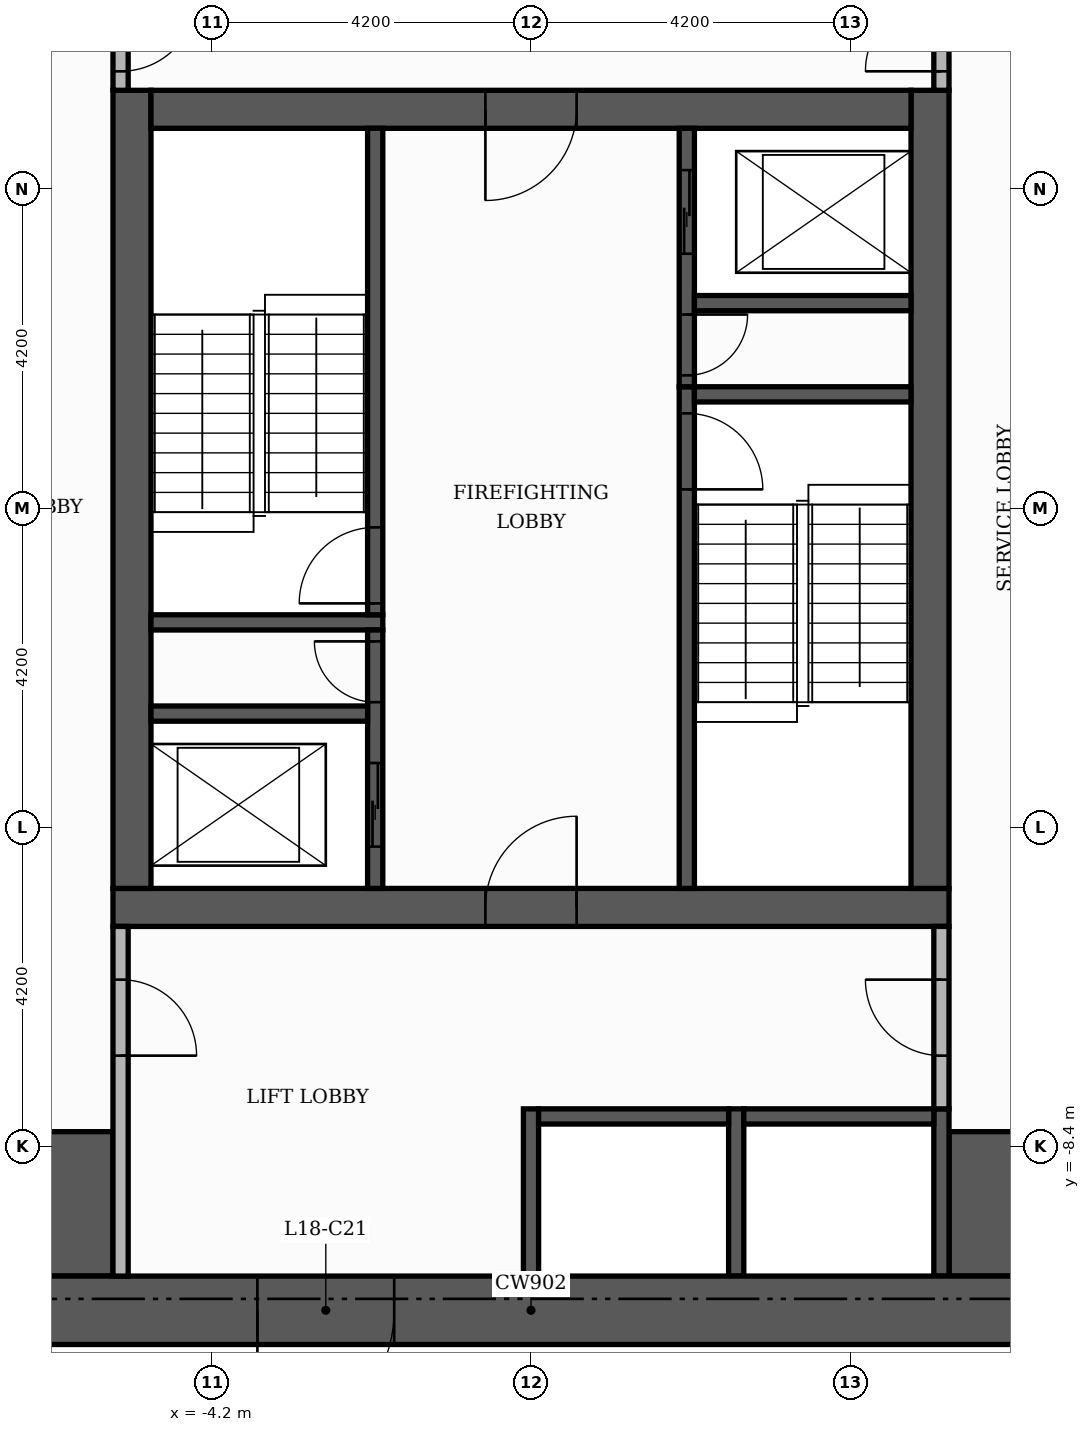
"""IFC4 building model, lengths in metres.
Left out: names, types, materials, properties, quantities, classifications, styles, units other than length and angle.
Written with IfcOpenShell. Run it as: python <this file> out.ifc"""

import sys

from ifc_helpers import new_model, si_unit, direction, frame, frame_2d, origin, place, context, subcontext, project, spatial, rectangle, extrude, element, fill, save


model = new_model("IFC4")
c1 = context("Model", 3, precision=1e-05, world=origin(), true_north=direction((0.0, 1.0)))
c2 = subcontext(c1, "Body", "Model", "MODEL_VIEW")
j1 = project(units=[si_unit("LENGTHUNIT", "METRE"), si_unit("PLANEANGLEUNIT", "RADIAN")], contexts=[c1])
p1 = place(None, origin())
s1 = spatial("IfcSite", under=j1, at=p1, CompositionType="ELEMENT")
p2 = place(p1, origin())
s2 = spatial("IfcBuilding", under=s1, at=p2, CompositionType="ELEMENT")
p3 = place(p2, frame((0.0, 0.0, 79.2)))
s3 = spatial("IfcBuildingStorey", under=s2, at=p3, CompositionType="ELEMENT", Elevation=79.2)
p4 = place(p3, frame((-5.5, -5.25, 0.0), z_axis=(0.0, 0.0, 1.0), x_axis=(1.0, 0.0, 0.0)))
e1 = element("IfcWall", 1, at=p4, inside=s3, PredefinedType="SHEAR", context=c2, shape_type="SweptSolid", body=[
    extrude(rectangle(XDim=11.0, YDim=0.5, at=frame_2d((5.5, 0.0))), origin(), (0.0, 0.0, 1.0), 3.48),
])
p5 = place(p4, frame((4.9, 0.0, 0.0)))
e2 = element("IfcOpeningElement", 2, at=p5, cuts=e1, PredefinedType="OPENING", context=c2, shape_type="SweptSolid", body=[
    extrude(rectangle(XDim=1.2, YDim=2.1, at=frame_2d((0.6, 1.05))), frame((0.0, 0.26, 0.0), z_axis=(0.0, -1.0, 0.0), x_axis=(1.0, 0.0, 0.0)), (0.0, 0.0, 1.0), 0.52),
])
for number, where, z_axis, x_axis in (
    (3, (-5.25, -5.0, 0.0), (0.0, 0.0, 1.0), (0.0, 1.0, 0.0)),
    (4, (5.25, -5.0, 0.0), (0.0, 0.0, 1.0), (0.0, 1.0, 0.0)),
):
    element("IfcWall", number, at=place(p3, frame(where, z_axis=z_axis, x_axis=x_axis)), inside=s3, PredefinedType="SHEAR", context=c2, shape_type="SweptSolid", body=[
        extrude(rectangle(XDim=10.5, YDim=0.5, at=frame_2d((5.25, 0.0))), origin(), (0.0, 0.0, 1.0), 3.48),
    ])
p6 = place(p3, frame((-5.0, 5.25, 0.0), z_axis=(0.0, 0.0, 1.0), x_axis=(1.0, 0.0, 0.0)))
e5 = element("IfcWall", 5, at=p6, inside=s3, PredefinedType="SHEAR", context=c2, shape_type="SweptSolid", body=[
    extrude(rectangle(XDim=10.0, YDim=0.5, at=frame_2d((5.0, 0.0))), origin(), (0.0, 0.0, 1.0), 3.48),
])
p7 = place(p6, frame((4.4, 0.0, 0.0)))
e6 = element("IfcOpeningElement", 6, at=p7, cuts=e5, PredefinedType="OPENING", context=c2, shape_type="SweptSolid", body=[
    extrude(rectangle(XDim=1.2, YDim=2.1, at=frame_2d((0.6, 1.05))), frame((0.0, 0.26, 0.0), z_axis=(0.0, -1.0, 0.0), x_axis=(1.0, 0.0, 0.0)), (0.0, 0.0, 1.0), 0.52),
])
for number, where, z_axis, x_axis in (
    (7, (-10.1, -9.15, 0.0), (0.0, 0.0, 1.0), (1.0, 0.0, 0.0)),
    (8, (5.5, -9.15, 0.0), (0.0, 0.0, 1.0), (1.0, 0.0, 0.0)),
):
    element("IfcWall", number, at=place(p3, frame(where, z_axis=z_axis, x_axis=x_axis)), inside=s3, PredefinedType="SHEAR", context=c2, shape_type="SweptSolid", body=[
        extrude(rectangle(XDim=4.6, YDim=1.9, at=frame_2d((2.3, 0.0))), origin(), (0.0, 0.0, 1.0), 3.48),
    ])
p8 = place(p3, frame((2.05, -5.0, 0.0), z_axis=(0.0, 0.0, 1.0), x_axis=(0.0, 1.0, 0.0)))
e9 = element("IfcWall", 9, at=p8, inside=s3, PredefinedType="SHEAR", context=c2, shape_type="SweptSolid", body=[
    extrude(rectangle(XDim=6.6, YDim=0.2, at=frame_2d((3.3, 0.0))), origin(), (0.0, 0.0, 1.0), 3.48),
])
p9 = place(p8, frame((5.25, 0.0, 0.0)))
e10 = element("IfcOpeningElement", 10, at=p9, cuts=e9, PredefinedType="OPENING", context=c2, shape_type="SweptSolid", body=[
    extrude(rectangle(XDim=1.0, YDim=2.1, at=frame_2d((0.5, 1.05))), frame((0.0, 0.11, 0.0), z_axis=(0.0, -1.0, 0.0), x_axis=(1.0, 0.0, 0.0)), (0.0, 0.0, 1.0), 0.22),
])
p10 = place(p3, frame((-5.0, -1.5, 0.0), z_axis=(0.0, 0.0, 1.0), x_axis=(1.0, 0.0, 0.0)))
e11 = element("IfcWall", 11, at=p10, inside=s3, PredefinedType="SHEAR", context=c2, shape_type="SweptSolid", body=[
    extrude(rectangle(XDim=3.05, YDim=0.2, at=frame_2d((1.525, 0.0))), origin(), (0.0, 0.0, 1.0), 3.48),
])
p11 = place(p3, frame((-2.05, -1.4, 0.0), z_axis=(0.0, 0.0, 1.0), x_axis=(0.0, 1.0, 0.0)))
e12 = element("IfcWall", 12, at=p11, inside=s3, PredefinedType="SHEAR", context=c2, shape_type="SweptSolid", body=[
    extrude(rectangle(XDim=6.4, YDim=0.2, at=frame_2d((3.2, 0.0))), origin(), (0.0, 0.0, 1.0), 3.48),
])
p12 = place(p11, frame((0.15, 0.0, 0.0)))
e13 = element("IfcOpeningElement", 13, at=p12, cuts=e12, PredefinedType="OPENING", context=c2, shape_type="SweptSolid", body=[
    extrude(rectangle(XDim=1.0, YDim=2.1, at=frame_2d((0.5, 1.05))), frame((0.0, 0.11, 0.0), z_axis=(0.0, -1.0, 0.0), x_axis=(1.0, 0.0, 0.0)), (0.0, 0.0, 1.0), 0.22),
])
p13 = place(p3, frame((2.15, 1.5, 0.0), z_axis=(0.0, 0.0, 1.0), x_axis=(1.0, 0.0, 0.0)))
e14 = element("IfcWall", 14, at=p13, inside=s3, PredefinedType="SHEAR", context=c2, shape_type="SweptSolid", body=[
    extrude(rectangle(XDim=2.85, YDim=0.2, at=frame_2d((1.425, 0.0))), origin(), (0.0, 0.0, 1.0), 3.48),
])
for number, where, z_axis, x_axis in (
    (15, (0.0, -10.1, 0.0), (0.0, 0.0, 1.0), (0.0, 1.0, 0.0)),
    (16, (2.7, -10.1, 0.0), (0.0, 0.0, 1.0), (0.0, 1.0, 0.0)),
    (17, (5.4, -10.1, 0.0), (0.0, 0.0, 1.0), (0.0, 1.0, 0.0)),
):
    element("IfcWall", number, at=place(p3, frame(where, z_axis=z_axis, x_axis=x_axis)), inside=s3, PredefinedType="SHEAR", context=c2, shape_type="SweptSolid", body=[
        extrude(rectangle(XDim=2.2, YDim=0.2, at=frame_2d((1.1, 0.0))), origin(), (0.0, 0.0, 1.0), 3.48),
    ])
for number, where, z_axis, x_axis in (
    (18, (0.1, -8.0, 0.0), (0.0, 0.0, 1.0), (1.0, 0.0, 0.0)),
    (19, (2.8, -8.0, 0.0), (0.0, 0.0, 1.0), (1.0, 0.0, 0.0)),
):
    element("IfcWall", number, at=place(p3, frame(where, z_axis=z_axis, x_axis=x_axis)), inside=s3, PredefinedType="SHEAR", context=c2, shape_type="SweptSolid", body=[
        extrude(rectangle(XDim=2.5, YDim=0.2, at=frame_2d((1.25, 0.0))), origin(), (0.0, 0.0, 1.0), 3.48),
    ])
p14 = place(p3, frame((-2.05, -5.0, 0.0), z_axis=(0.0, 0.0, 1.0), x_axis=(0.0, 1.0, 0.0)))
e20 = element("IfcWall", 20, at=p14, inside=s3, PredefinedType="SHEAR", context=c2, shape_type="SweptSolid", body=[
    extrude(rectangle(XDim=3.4, YDim=0.2, at=frame_2d((1.7, 0.0))), origin(), (0.0, 0.0, 1.0), 3.48),
])
p15 = place(p14, frame((0.55, 0.0, 0.0)))
e21 = element("IfcOpeningElement", 21, at=p15, cuts=e20, PredefinedType="OPENING", context=c2, shape_type="SweptSolid", body=[
    extrude(rectangle(XDim=1.1, YDim=2.1, at=frame_2d((0.55, 1.05))), frame((0.0, 0.11, 0.0), z_axis=(0.0, -1.0, 0.0), x_axis=(1.0, 0.0, 0.0)), (0.0, 0.0, 1.0), 0.22),
])
p16 = place(p14, frame((2.45, 0.0, 0.0)))
e22 = element("IfcOpeningElement", 22, at=p16, cuts=e20, PredefinedType="OPENING", context=c2, shape_type="SweptSolid", body=[
    extrude(rectangle(XDim=0.8, YDim=2.1, at=frame_2d((0.4, 1.05))), frame((0.0, 0.11, 0.0), z_axis=(0.0, -1.0, 0.0), x_axis=(1.0, 0.0, 0.0)), (0.0, 0.0, 1.0), 0.22),
])
p17 = place(p3, frame((-5.0, -2.7, 0.0), z_axis=(0.0, 0.0, 1.0), x_axis=(1.0, 0.0, 0.0)))
e23 = element("IfcWall", 23, at=p17, inside=s3, PredefinedType="SHEAR", context=c2, shape_type="SweptSolid", body=[
    extrude(rectangle(XDim=2.85, YDim=0.2, at=frame_2d((1.425, 0.0))), origin(), (0.0, 0.0, 1.0), 3.48),
])
p18 = place(p3, frame((2.05, 1.6, 0.0), z_axis=(0.0, 0.0, 1.0), x_axis=(0.0, 1.0, 0.0)))
e24 = element("IfcWall", 24, at=p18, inside=s3, PredefinedType="SHEAR", context=c2, shape_type="SweptSolid", body=[
    extrude(rectangle(XDim=3.4, YDim=0.2, at=frame_2d((1.7, 0.0))), origin(), (0.0, 0.0, 1.0), 3.48),
])
p19 = place(p18, frame((1.75, 0.0, 0.0)))
e25 = element("IfcOpeningElement", 25, at=p19, cuts=e24, PredefinedType="OPENING", context=c2, shape_type="SweptSolid", body=[
    extrude(rectangle(XDim=1.1, YDim=2.1, at=frame_2d((0.55, 1.05))), frame((0.0, 0.11, 0.0), z_axis=(0.0, -1.0, 0.0), x_axis=(1.0, 0.0, 0.0)), (0.0, 0.0, 1.0), 0.22),
])
p20 = place(p18, frame((0.15, 0.0, 0.0)))
e26 = element("IfcOpeningElement", 26, at=p20, cuts=e24, PredefinedType="OPENING", context=c2, shape_type="SweptSolid", body=[
    extrude(rectangle(XDim=0.8, YDim=2.1, at=frame_2d((0.4, 1.05))), frame((0.0, 0.11, 0.0), z_axis=(0.0, -1.0, 0.0), x_axis=(1.0, 0.0, 0.0)), (0.0, 0.0, 1.0), 0.22),
])
p21 = place(p3, frame((2.15, 2.7, 0.0), z_axis=(0.0, 0.0, 1.0), x_axis=(1.0, 0.0, 0.0)))
e27 = element("IfcWall", 27, at=p21, inside=s3, PredefinedType="SHEAR", context=c2, shape_type="SweptSolid", body=[
    extrude(rectangle(XDim=2.85, YDim=0.2, at=frame_2d((1.425, 0.0))), origin(), (0.0, 0.0, 1.0), 3.48),
])
p22 = place(p3, frame((-11.0, -10.55, 0.0), z_axis=(0.0, 0.0, 1.0), x_axis=(1.0, 0.0, 0.0)))
e28 = element("IfcWall", 28, at=p22, inside=s3, PredefinedType="SHEAR", context=c2, shape_type="SweptSolid", body=[
    extrude(rectangle(XDim=22.0, YDim=0.9, at=frame_2d((11.0, 0.0))), origin(), (0.0, 0.0, 1.0), 3.48),
])
p23 = place(p22, frame((7.4, 0.0, 0.0)))
e29 = element("IfcOpeningElement", 29, at=p23, cuts=e28, PredefinedType="OPENING", context=c2, shape_type="SweptSolid", body=[
    extrude(rectangle(XDim=1.8, YDim=2.2, at=frame_2d((0.9, 1.1))), frame((0.0, 0.46, 0.0), z_axis=(0.0, -1.0, 0.0), x_axis=(1.0, 0.0, 0.0)), (0.0, 0.0, 1.0), 0.92),
])
p24 = place(p3, frame((-5.4, -10.1, 0.0), z_axis=(0.0, 0.0, 1.0), x_axis=(0.0, 1.0, 0.0)))
e30 = element("IfcWall", 30, at=p24, inside=s3, PredefinedType="PARTITIONING", context=c2, shape_type="SweptSolid", body=[
    extrude(rectangle(XDim=4.6, YDim=0.2, at=frame_2d((2.3, 0.0))), origin(), (0.0, 0.0, 1.0), 3.48),
])
p25 = place(p24, frame((2.9, 0.0, 0.0)))
e31 = element("IfcOpeningElement", 31, at=p25, cuts=e30, PredefinedType="OPENING", context=c2, shape_type="SweptSolid", body=[
    extrude(rectangle(XDim=1.0, YDim=2.1, at=frame_2d((0.5, 1.05))), frame((0.0, 0.11, 0.0), z_axis=(0.0, -1.0, 0.0), x_axis=(1.0, 0.0, 0.0)), (0.0, 0.0, 1.0), 0.22),
])
p26 = place(p3, frame((5.4, -7.9, 0.0), z_axis=(0.0, 0.0, 1.0), x_axis=(0.0, 1.0, 0.0)))
e32 = element("IfcWall", 32, at=p26, inside=s3, PredefinedType="PARTITIONING", context=c2, shape_type="SweptSolid", body=[
    extrude(rectangle(XDim=2.4, YDim=0.2, at=frame_2d((1.2, 0.0))), origin(), (0.0, 0.0, 1.0), 3.48),
])
p27 = place(p26, frame((0.7, 0.0, 0.0)))
e33 = element("IfcOpeningElement", 33, at=p27, cuts=e32, PredefinedType="OPENING", context=c2, shape_type="SweptSolid", body=[
    extrude(rectangle(XDim=1.0, YDim=2.1, at=frame_2d((0.5, 1.05))), frame((0.0, 0.11, 0.0), z_axis=(0.0, -1.0, 0.0), x_axis=(1.0, 0.0, 0.0)), (0.0, 0.0, 1.0), 0.22),
])
p28 = place(p3, frame((-5.4, 5.5, 0.0), z_axis=(0.0, 0.0, 1.0), x_axis=(0.0, 1.0, 0.0)))
e34 = element("IfcWall", 34, at=p28, inside=s3, PredefinedType="PARTITIONING", context=c2, shape_type="SweptSolid", body=[
    extrude(rectangle(XDim=1.55, YDim=0.2, at=frame_2d((0.775, 0.0))), origin(), (0.0, 0.0, 1.0), 3.48),
])
p29 = place(p28, frame((0.25, 0.0, 0.0)))
e35 = element("IfcOpeningElement", 35, at=p29, cuts=e34, PredefinedType="OPENING", context=c2, shape_type="SweptSolid", body=[
    extrude(rectangle(XDim=1.0, YDim=2.1, at=frame_2d((0.5, 1.05))), frame((0.0, 0.11, 0.0), z_axis=(0.0, -1.0, 0.0), x_axis=(1.0, 0.0, 0.0)), (0.0, 0.0, 1.0), 0.22),
])
p30 = place(p3, frame((5.4, 5.5, 0.0), z_axis=(0.0, 0.0, 1.0), x_axis=(0.0, 1.0, 0.0)))
e36 = element("IfcWall", 36, at=p30, inside=s3, PredefinedType="PARTITIONING", context=c2, shape_type="SweptSolid", body=[
    extrude(rectangle(XDim=4.6, YDim=0.2, at=frame_2d((2.3, 0.0))), origin(), (0.0, 0.0, 1.0), 3.48),
])
p31 = place(p30, frame((0.25, 0.0, 0.0)))
e37 = element("IfcOpeningElement", 37, at=p31, cuts=e36, PredefinedType="OPENING", context=c2, shape_type="SweptSolid", body=[
    extrude(rectangle(XDim=1.0, YDim=2.1, at=frame_2d((0.5, 1.05))), frame((0.0, 0.11, 0.0), z_axis=(0.0, -1.0, 0.0), x_axis=(1.0, 0.0, 0.0)), (0.0, 0.0, 1.0), 0.22),
])
p32 = place(p19, origin())
e38 = element("IfcDoor", 38, at=p32, inside=s3, OperationType="SLIDING_TO_LEFT", PredefinedType="DOOR", context=c2, shape_type="SweptSolid", body=[
    extrude(rectangle(XDim=1.1, YDim=2.1, at=frame_2d((0.55, 1.05))), frame((0.0, 0.025, 0.0), z_axis=(0.0, -1.0, 0.0), x_axis=(1.0, 0.0, 0.0)), (0.0, 0.0, 1.0), 0.05),
])
fill(e25, e38)
p33 = place(p15, origin())
e39 = element("IfcDoor", 39, at=p33, inside=s3, OperationType="SLIDING_TO_LEFT", PredefinedType="DOOR", context=c2, shape_type="SweptSolid", body=[
    extrude(rectangle(XDim=1.1, YDim=2.1, at=frame_2d((0.55, 1.05))), frame((0.0, 0.025, 0.0), z_axis=(0.0, -1.0, 0.0), x_axis=(1.0, 0.0, 0.0)), (0.0, 0.0, 1.0), 0.05),
])
fill(e21, e39)
p34 = place(p12, origin())
e40 = element("IfcDoor", 40, at=p34, inside=s3, OperationType="SINGLE_SWING_LEFT", PredefinedType="DOOR", context=c2, shape_type="SweptSolid", body=[
    extrude(rectangle(XDim=1.0, YDim=2.1, at=frame_2d((0.5, 1.05))), frame((0.0, 0.025, 0.0), z_axis=(0.0, -1.0, 0.0), x_axis=(1.0, 0.0, 0.0)), (0.0, 0.0, 1.0), 0.05),
])
fill(e13, e40)
p35 = place(p9, frame((1.0, 0.0, 0.0), z_axis=(0.0, 0.0, 1.0), x_axis=(-1.0, 0.0, 0.0)))
e41 = element("IfcDoor", 41, at=p35, inside=s3, OperationType="SINGLE_SWING_LEFT", PredefinedType="DOOR", context=c2, shape_type="SweptSolid", body=[
    extrude(rectangle(XDim=1.0, YDim=2.1, at=frame_2d((0.5, 1.05))), frame((0.0, 0.025, 0.0), z_axis=(0.0, -1.0, 0.0), x_axis=(1.0, 0.0, 0.0)), (0.0, 0.0, 1.0), 0.05),
])
fill(e10, e41)
p36 = place(p20, frame((0.8, 0.0, 0.0), z_axis=(0.0, 0.0, 1.0), x_axis=(-1.0, 0.0, 0.0)))
e42 = element("IfcDoor", 42, at=p36, inside=s3, OperationType="SINGLE_SWING_RIGHT", PredefinedType="DOOR", context=c2, shape_type="SweptSolid", body=[
    extrude(rectangle(XDim=0.8, YDim=2.1, at=frame_2d((0.4, 1.05))), frame((0.0, 0.025, 0.0), z_axis=(0.0, -1.0, 0.0), x_axis=(1.0, 0.0, 0.0)), (0.0, 0.0, 1.0), 0.05),
])
fill(e26, e42)
p37 = place(p16, origin())
e43 = element("IfcDoor", 43, at=p37, inside=s3, OperationType="SINGLE_SWING_RIGHT", PredefinedType="DOOR", context=c2, shape_type="SweptSolid", body=[
    extrude(rectangle(XDim=0.8, YDim=2.1, at=frame_2d((0.4, 1.05))), frame((0.0, 0.025, 0.0), z_axis=(0.0, -1.0, 0.0), x_axis=(1.0, 0.0, 0.0)), (0.0, 0.0, 1.0), 0.05),
])
fill(e22, e43)
p38 = place(p7, frame((1.2, 0.0, 0.0), z_axis=(0.0, 0.0, 1.0), x_axis=(-1.0, 0.0, 0.0)))
e44 = element("IfcDoor", 44, at=p38, inside=s3, OperationType="SINGLE_SWING_LEFT", PredefinedType="DOOR", context=c2, shape_type="SweptSolid", body=[
    extrude(rectangle(XDim=1.2, YDim=2.1, at=frame_2d((0.6, 1.05))), frame((0.0, 0.025, 0.0), z_axis=(0.0, -1.0, 0.0), x_axis=(1.0, 0.0, 0.0)), (0.0, 0.0, 1.0), 0.05),
])
fill(e6, e44)
p39 = place(p5, origin())
e45 = element("IfcDoor", 45, at=p39, inside=s3, OperationType="SINGLE_SWING_RIGHT", PredefinedType="DOOR", context=c2, shape_type="SweptSolid", body=[
    extrude(rectangle(XDim=1.2, YDim=2.1, at=frame_2d((0.6, 1.05))), frame((0.0, 0.025, 0.0), z_axis=(0.0, -1.0, 0.0), x_axis=(1.0, 0.0, 0.0)), (0.0, 0.0, 1.0), 0.05),
])
fill(e2, e45)
p40 = place(p29, frame((1.0, 0.0, 0.0), z_axis=(0.0, 0.0, 1.0), x_axis=(-1.0, 0.0, 0.0)))
e46 = element("IfcDoor", 46, at=p40, inside=s3, OperationType="SINGLE_SWING_RIGHT", PredefinedType="DOOR", context=c2, shape_type="SweptSolid", body=[
    extrude(rectangle(XDim=1.0, YDim=2.1, at=frame_2d((0.5, 1.05))), frame((0.0, 0.025, 0.0), z_axis=(0.0, -1.0, 0.0), x_axis=(1.0, 0.0, 0.0)), (0.0, 0.0, 1.0), 0.05),
])
fill(e35, e46)
p41 = place(p31, origin())
e47 = element("IfcDoor", 47, at=p41, inside=s3, OperationType="SINGLE_SWING_LEFT", PredefinedType="DOOR", context=c2, shape_type="SweptSolid", body=[
    extrude(rectangle(XDim=1.0, YDim=2.1, at=frame_2d((0.5, 1.05))), frame((0.0, 0.025, 0.0), z_axis=(0.0, -1.0, 0.0), x_axis=(1.0, 0.0, 0.0)), (0.0, 0.0, 1.0), 0.05),
])
fill(e37, e47)
p42 = place(p25, frame((1.0, 0.0, 0.0), z_axis=(0.0, 0.0, 1.0), x_axis=(-1.0, 0.0, 0.0)))
e48 = element("IfcDoor", 48, at=p42, inside=s3, OperationType="SINGLE_SWING_LEFT", PredefinedType="DOOR", context=c2, shape_type="SweptSolid", body=[
    extrude(rectangle(XDim=1.0, YDim=2.1, at=frame_2d((0.5, 1.05))), frame((0.0, 0.025, 0.0), z_axis=(0.0, -1.0, 0.0), x_axis=(1.0, 0.0, 0.0)), (0.0, 0.0, 1.0), 0.05),
])
fill(e31, e48)
p43 = place(p27, origin())
e49 = element("IfcDoor", 49, at=p43, inside=s3, OperationType="SINGLE_SWING_RIGHT", PredefinedType="DOOR", context=c2, shape_type="SweptSolid", body=[
    extrude(rectangle(XDim=1.0, YDim=2.1, at=frame_2d((0.5, 1.05))), frame((0.0, 0.025, 0.0), z_axis=(0.0, -1.0, 0.0), x_axis=(1.0, 0.0, 0.0)), (0.0, 0.0, 1.0), 0.05),
])
fill(e33, e49)
p44 = place(p23, frame((1.8, 0.0, 0.0), z_axis=(0.0, 0.0, 1.0), x_axis=(-1.0, 0.0, 0.0)))
e50 = element("IfcDoor", 50, at=p44, inside=s3, OperationType="DOUBLE_DOOR_SINGLE_SWING", PredefinedType="DOOR", context=c2, shape_type="SweptSolid", body=[
    extrude(rectangle(XDim=1.8, YDim=2.2, at=frame_2d((0.9, 1.1))), frame((0.0, 0.025, 0.0), z_axis=(0.0, -1.0, 0.0), x_axis=(1.0, 0.0, 0.0)), (0.0, 0.0, 1.0), 0.05),
])
fill(e29, e50)
save(model, sys.argv[1])
